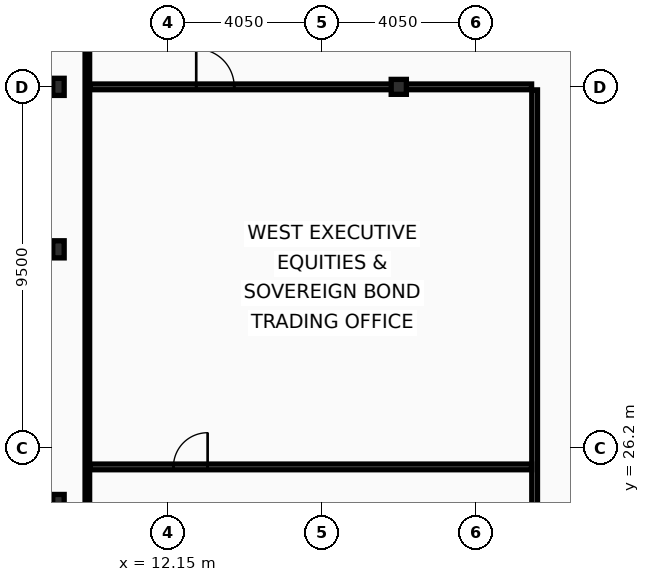
"""IFC4 building model, lengths in metres.
Left out: names, types, materials, properties, quantities, classifications, styles, units other than length and angle.
Written with IfcOpenShell. Run it as: python <this file> out.ifc"""

import sys

from ifc_helpers import new_model, si_unit, direction, frame, frame_2d, origin, origin_2d, place, context, subcontext, project, spatial, rectangle, i_section, extrude, element, fill, save


model = new_model("IFC4")
c1 = context("Model", 3, precision=1e-05, world=origin(), true_north=direction((0.0, 1.0)))
c2 = subcontext(c1, "Body", "Model", "MODEL_VIEW")
j1 = project(units=[si_unit("LENGTHUNIT", "METRE"), si_unit("PLANEANGLEUNIT", "RADIAN")], contexts=[c1])
p1 = place(None, origin())
s1 = spatial("IfcSite", under=j1, at=p1, CompositionType="ELEMENT")
p2 = place(p1, origin())
s2 = spatial("IfcBuilding", under=s1, at=p2, CompositionType="ELEMENT")
p3 = place(p2, frame((0.0, 0.0, 284.2)))
s3 = spatial("IfcBuildingStorey", under=s2, at=p3, CompositionType="ELEMENT", Elevation=284.2)
for number, where, z_axis, x_axis in (
    (1, (9.27, 24.75, 0.0), (0.0, 0.0, 1.0), (1.0, 0.0, 0.0)),
    (2, (9.27, 31.425, 0.0), (0.0, 0.0, 1.0), (1.0, 0.0, 0.0)),
    (3, (9.27, 35.7, 0.0), (0.0, 0.0, 1.0), (1.0, 0.0, 0.0)),
):
    element("IfcColumn", number, at=place(p3, frame(where, z_axis=z_axis, x_axis=x_axis)), inside=s3, PredefinedType="COLUMN", context=c2, shape_type="SweptSolid", body=[
        extrude(i_section(OverallWidth=0.3, OverallDepth=0.45, WebThickness=0.014, FlangeThickness=0.026, at=origin_2d()), origin(), (0.0, 0.0, 1.0), 3.6),
    ])
p4 = place(p3, frame((18.225, 35.7, 0.0), z_axis=(0.0, 0.0, 1.0), x_axis=(1.0, 0.0, 0.0)))
e4 = element("IfcColumn", 4, at=p4, inside=s3, PredefinedType="COLUMN", context=c2, shape_type="SweptSolid", body=[
    extrude(i_section(OverallWidth=0.399, OverallDepth=0.393, WebThickness=0.023, FlangeThickness=0.037, at=origin_2d()), origin(), (0.0, 0.0, 1.0), 3.6),
])
p5 = place(p3, frame((21.8, 10.665, 0.0), z_axis=(0.0, 0.0, 1.0), x_axis=(0.0, 1.0, 0.0)))
e5 = element("IfcWall", 5, at=p5, inside=s3, PredefinedType="PARTITIONING", context=c2, shape_type="SweptSolid", body=[
    extrude(rectangle(XDim=24.955, YDim=0.15, at=frame_2d((12.478, 0.0))), origin(), (0.0, 0.0, 1.0), 3.03),
])
p6 = place(p5, frame((4.2, 0.0, 0.0)))
e6 = element("IfcOpeningElement", 6, at=p6, cuts=e5, PredefinedType="OPENING", context=c2, shape_type="SweptSolid", body=[
    extrude(rectangle(XDim=1.1, YDim=2.1, at=frame_2d((0.55, 1.05))), frame((0.0, 0.085, 0.0), z_axis=(0.0, -1.0, 0.0), x_axis=(1.0, 0.0, 0.0)), (0.0, 0.0, 1.0), 0.17),
])
p7 = place(p3, frame((10.095, 35.7, 0.0), z_axis=(0.0, 0.0, 1.0), x_axis=(1.0, 0.0, 0.0)))
e7 = element("IfcWall", 7, at=p7, inside=s3, PredefinedType="PARTITIONING", context=c2, shape_type="SweptSolid", body=[
    extrude(rectangle(XDim=11.625, YDim=0.15, at=frame_2d((5.812, 0.0))), origin(), (0.0, 0.0, 1.0), 2.78),
])
p8 = place(p7, frame((2.8, 0.0, 0.0)))
e8 = element("IfcOpeningElement", 8, at=p8, cuts=e7, PredefinedType="OPENING", context=c2, shape_type="SweptSolid", body=[
    extrude(rectangle(XDim=1.0, YDim=2.05, at=frame_2d((0.5, 1.025))), frame((0.0, 0.085, 0.0), z_axis=(0.0, -1.0, 0.0), x_axis=(1.0, 0.0, 0.0)), (0.0, 0.0, 1.0), 0.17),
])
p9 = place(p3, frame((10.095, 25.7, 0.0), z_axis=(0.0, 0.0, 1.0), x_axis=(1.0, 0.0, 0.0)))
e9 = element("IfcWall", 9, at=p9, inside=s3, PredefinedType="PARTITIONING", context=c2, shape_type="SweptSolid", body=[
    extrude(rectangle(XDim=11.625, YDim=0.15, at=frame_2d((5.812, 0.0))), origin(), (0.0, 0.0, 1.0), 2.78),
])
p10 = place(p9, frame((2.2, 0.0, 0.0)))
e10 = element("IfcOpeningElement", 10, at=p10, cuts=e9, PredefinedType="OPENING", context=c2, shape_type="SweptSolid", body=[
    extrude(rectangle(XDim=0.9, YDim=2.05, at=frame_2d((0.45, 1.025))), frame((0.0, 0.085, 0.0), z_axis=(0.0, -1.0, 0.0), x_axis=(1.0, 0.0, 0.0)), (0.0, 0.0, 1.0), 0.17),
])
p11 = place(p3, frame((10.03, 10.665, 0.0), z_axis=(0.0, 0.0, 1.0), x_axis=(0.0, 1.0, 0.0)))
e11 = element("IfcWall", 11, at=p11, inside=s3, PredefinedType="PARTITIONING", context=c2, shape_type="SweptSolid", body=[
    extrude(rectangle(XDim=42.11, YDim=0.12, at=frame_2d((21.055, 0.0))), origin(), (0.0, 0.0, 1.0), 2.78),
])
p12 = place(p8, origin())
e12 = element("IfcDoor", 12, at=p12, inside=s3, OperationType="SINGLE_SWING_LEFT", PredefinedType="DOOR", context=c2, shape_type="SweptSolid", body=[
    extrude(rectangle(XDim=1.0, YDim=2.05, at=frame_2d((0.5, 1.025))), frame((0.0, 0.025, 0.0), z_axis=(0.0, -1.0, 0.0), x_axis=(1.0, 0.0, 0.0)), (0.0, 0.0, 1.0), 0.05),
])
fill(e8, e12)
p13 = place(p10, origin())
e13 = element("IfcDoor", 13, at=p13, inside=s3, OperationType="SINGLE_SWING_RIGHT", PredefinedType="DOOR", context=c2, shape_type="SweptSolid", body=[
    extrude(rectangle(XDim=0.9, YDim=2.05, at=frame_2d((0.45, 1.025))), frame((0.0, 0.025, 0.0), z_axis=(0.0, -1.0, 0.0), x_axis=(1.0, 0.0, 0.0)), (0.0, 0.0, 1.0), 0.05),
])
fill(e10, e13)
save(model, sys.argv[1])
